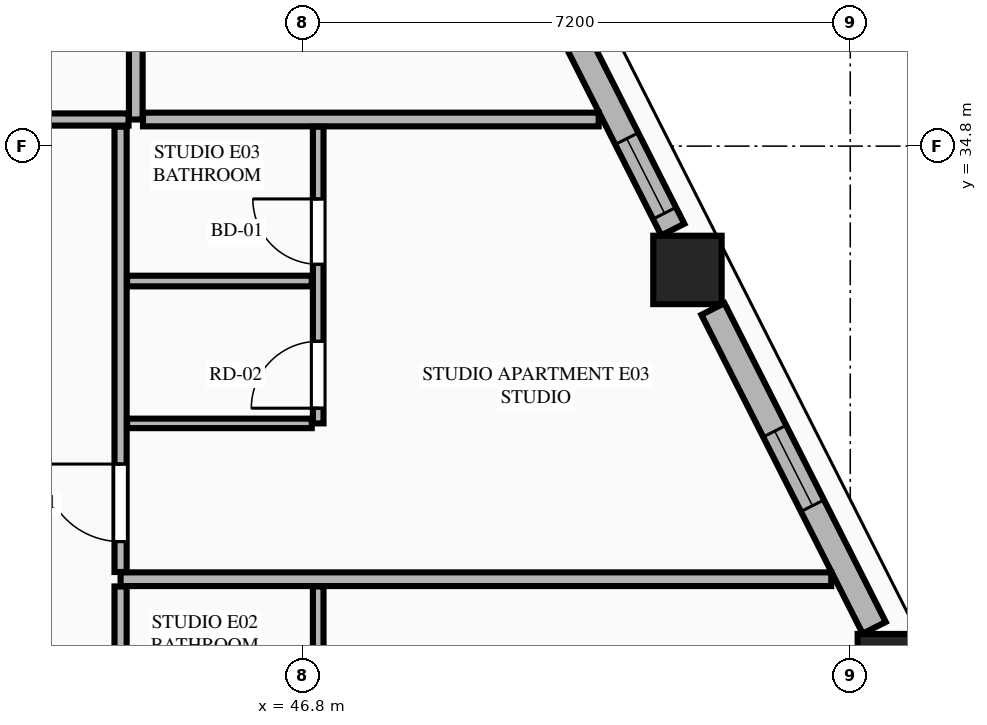
"""IFC4 building model, lengths in metres.
Left out: names, types, materials, properties, quantities, classifications, styles, units other than length and angle.
Written with IfcOpenShell. Run it as: python <this file> out.ifc"""

import sys

from ifc_helpers import new_model, si_unit, direction, frame, frame_2d, origin, origin_2d, place, context, subcontext, project, spatial, rectangle, extrude, element, fill, save


model = new_model("IFC4")
c1 = context("Model", 3, precision=1e-05, world=origin(), true_north=direction((0.0, 1.0)))
c2 = subcontext(c1, "Body", "Model", "MODEL_VIEW")
j1 = project(units=[si_unit("LENGTHUNIT", "METRE"), si_unit("PLANEANGLEUNIT", "RADIAN")], contexts=[c1])
p1 = place(None, origin())
s1 = spatial("IfcSite", under=j1, at=p1, CompositionType="ELEMENT")
p2 = place(p1, origin())
s2 = spatial("IfcBuilding", under=s1, at=p2, CompositionType="ELEMENT")
p3 = place(p2, frame((0.0, 0.0, 186.1)))
s3 = spatial("IfcBuildingStorey", under=s2, at=p3, CompositionType="ELEMENT", Elevation=186.1)
for number, where, z_axis, x_axis in (
    (1, (54.547, 27.932, 0.0), (0.0, 0.0, 1.0), (1.0, 0.0, 0.0)),
    (2, (51.858, 33.171, 0.0), (0.0, 0.0, 1.0), (1.0, 0.0, 0.0)),
):
    element("IfcColumn", number, at=place(p3, frame(where, z_axis=z_axis, x_axis=x_axis)), inside=s3, PredefinedType="COLUMN", context=c2, shape_type="SweptSolid", body=[
        extrude(rectangle(XDim=0.9, YDim=0.9, at=origin_2d()), origin(), (0.0, 0.0, 1.0), 3.55),
    ])
p4 = place(p3, frame((54.315, 28.463, 0.0), z_axis=(0.0, 0.0, 1.0), x_axis=(-0.451426298588, 0.892308409096, 0.0)))
e3 = element("IfcWall", 3, at=p4, inside=s3, PredefinedType="STANDARD", context=c2, shape_type="SweptSolid", body=[
    extrude(rectangle(XDim=4.7, YDim=0.34, at=frame_2d((2.35, 0.0))), origin(), (0.0, 0.0, 1.0), 2.883),
])
p5 = place(p4, frame((1.8, 0.0, 0.75)))
e4 = element("IfcOpeningElement", 4, at=p5, cuts=e3, PredefinedType="OPENING", context=c2, shape_type="SweptSolid", body=[
    extrude(rectangle(XDim=1.1, YDim=1.983, at=frame_2d((0.55, 0.991))), frame((0.0, 0.18, 0.0), z_axis=(0.0, -1.0, 0.0), x_axis=(1.0, 0.0, 0.0)), (0.0, 0.0, 1.0), 0.36),
])
p6 = place(p3, frame((51.665, 33.702, 0.0), z_axis=(0.0, 0.0, 1.0), x_axis=(-0.451524246964, 0.89225884944, 0.0)))
e5 = element("IfcWall", 5, at=p6, inside=s3, PredefinedType="STANDARD", context=c2, shape_type="SweptSolid", body=[
    extrude(rectangle(XDim=4.91, YDim=0.34, at=frame_2d((2.455, 0.0))), origin(), (0.0, 0.0, 1.0), 2.883),
])
p7 = place(p6, frame((0.241, 0.0, 0.75)))
e6 = element("IfcOpeningElement", 6, at=p7, cuts=e5, PredefinedType="OPENING", context=c2, shape_type="SweptSolid", body=[
    extrude(rectangle(XDim=1.1, YDim=1.983, at=frame_2d((0.55, 0.991))), frame((0.0, 0.18, 0.0), z_axis=(0.0, -1.0, 0.0), x_axis=(1.0, 0.0, 0.0)), (0.0, 0.0, 1.0), 0.36),
])
p8 = place(p6, frame((2.847, 0.0, 0.75)))
e7 = element("IfcOpeningElement", 7, at=p8, cuts=e5, PredefinedType="OPENING", context=c2, shape_type="SweptSolid", body=[
    extrude(rectangle(XDim=1.1, YDim=1.983, at=frame_2d((0.55, 0.991))), frame((0.0, 0.18, 0.0), z_axis=(0.0, -1.0, 0.0), x_axis=(1.0, 0.0, 0.0)), (0.0, 0.0, 1.0), 0.36),
])
p9 = place(p3, frame((44.6, 35.15, 0.0), z_axis=(0.0, 0.0, 1.0), x_axis=(0.0, 1.0, 0.0)))
e8 = element("IfcWall", 8, at=p9, inside=s3, PredefinedType="PARTITIONING", context=c2, shape_type="SweptSolid", body=[
    extrude(rectangle(XDim=10.482, YDim=0.18, at=frame_2d((5.241, 0.0))), origin(), (0.0, 0.0, 1.0), 3.35),
])
p10 = place(p3, frame((20.295, 35.15, 0.0), z_axis=(0.0, 0.0, 1.0), x_axis=(1.0, 0.0, 0.0)))
e9 = element("IfcWall", 9, at=p10, inside=s3, PredefinedType="PARTITIONING", context=c2, shape_type="SweptSolid", body=[
    extrude(rectangle(XDim=24.21, YDim=0.16, at=frame_2d((12.105, 0.0))), origin(), (0.0, 0.0, 1.0), 3.35),
])
p11 = place(p10, frame((0.405, 0.0, 0.0)))
e10 = element("IfcOpeningElement", 10, at=p11, cuts=e9, PredefinedType="OPENING", context=c2, shape_type="SweptSolid", body=[
    extrude(rectangle(XDim=1.35, YDim=2.35, at=frame_2d((0.675, 1.175))), frame((0.0, 0.09, 0.0), z_axis=(0.0, -1.0, 0.0), x_axis=(1.0, 0.0, 0.0)), (0.0, 0.0, 1.0), 0.18),
])
p12 = place(p3, frame((44.695, 35.15, 0.0), z_axis=(0.0, 0.0, 1.0), x_axis=(1.0, 0.0, 0.0)))
e11 = element("IfcWall", 11, at=p12, inside=s3, PredefinedType="PARTITIONING", context=c2, shape_type="SweptSolid", body=[
    extrude(rectangle(XDim=5.995, YDim=0.18, at=frame_2d((2.998, 0.0))), origin(), (0.0, 0.0, 1.0), 3.35),
])
p13 = place(p3, frame((44.4, 22.771, 0.0), z_axis=(0.0, 0.0, 1.0), x_axis=(0.0, 1.0, 0.0)))
e12 = element("IfcWall", 12, at=p13, inside=s3, PredefinedType="PARTITIONING", context=c2, shape_type="SweptSolid", body=[
    extrude(rectangle(XDim=6.236, YDim=0.16, at=frame_2d((3.118, 0.0))), origin(), (0.0, 0.0, 1.0), 3.35),
])
p14 = place(p13, frame((0.4, 0.0, 0.0)))
e13 = element("IfcOpeningElement", 13, at=p14, cuts=e12, PredefinedType="OPENING", context=c2, shape_type="SweptSolid", body=[
    extrude(rectangle(XDim=1.02, YDim=2.25, at=frame_2d((0.51, 1.125))), frame((0.0, 0.09, 0.0), z_axis=(0.0, -1.0, 0.0), x_axis=(1.0, 0.0, 0.0)), (0.0, 0.0, 1.0), 0.18),
])
p15 = place(p3, frame((47.0, 24.726, 0.0), z_axis=(0.0, 0.0, 1.0), x_axis=(0.0, 1.0, 0.0)))
e14 = element("IfcWall", 14, at=p15, inside=s3, PredefinedType="PLUMBINGWALL", context=c2, shape_type="SweptSolid", body=[
    extrude(rectangle(XDim=4.281, YDim=0.14, at=frame_2d((2.141, 0.0))), origin(), (0.0, 0.0, 1.0), 3.35),
])
p16 = place(p15, frame((2.275, 0.0, 0.0)))
e15 = element("IfcOpeningElement", 15, at=p16, cuts=e14, PredefinedType="OPENING", context=c2, shape_type="SweptSolid", body=[
    extrude(rectangle(XDim=0.86, YDim=2.1, at=frame_2d((0.43, 1.05))), frame((0.0, 0.08, 0.0), z_axis=(0.0, -1.0, 0.0), x_axis=(1.0, 0.0, 0.0)), (0.0, 0.0, 1.0), 0.16),
])
p17 = place(p15, frame((0.2, 0.0, 0.0)))
e16 = element("IfcOpeningElement", 16, at=p17, cuts=e14, PredefinedType="OPENING", context=c2, shape_type="SweptSolid", body=[
    extrude(rectangle(XDim=0.88, YDim=2.15, at=frame_2d((0.44, 1.075))), frame((0.0, 0.08, 0.0), z_axis=(0.0, -1.0, 0.0), x_axis=(1.0, 0.0, 0.0)), (0.0, 0.0, 1.0), 0.16),
])
p18 = place(p3, frame((44.4, 29.102, 0.0), z_axis=(0.0, 0.0, 1.0), x_axis=(1.0, 0.0, 0.0)))
e17 = element("IfcWall", 17, at=p18, inside=s3, PredefinedType="PARTITIONING", context=c2, shape_type="SweptSolid", body=[
    extrude(rectangle(XDim=9.35, YDim=0.18, at=frame_2d((4.675, 0.0))), origin(), (0.0, 0.0, 1.0), 3.35),
])
p19 = place(p3, frame((44.4, 29.197, 0.0), z_axis=(0.0, 0.0, 1.0), x_axis=(0.0, 1.0, 0.0)))
e18 = element("IfcWall", 18, at=p19, inside=s3, PredefinedType="PARTITIONING", context=c2, shape_type="SweptSolid", body=[
    extrude(rectangle(XDim=5.858, YDim=0.16, at=frame_2d((2.929, 0.0))), origin(), (0.0, 0.0, 1.0), 3.35),
])
p20 = place(p19, frame((0.4, 0.0, 0.0)))
e19 = element("IfcOpeningElement", 19, at=p20, cuts=e18, PredefinedType="OPENING", context=c2, shape_type="SweptSolid", body=[
    extrude(rectangle(XDim=1.02, YDim=2.25, at=frame_2d((0.51, 1.125))), frame((0.0, 0.09, 0.0), z_axis=(0.0, -1.0, 0.0), x_axis=(1.0, 0.0, 0.0)), (0.0, 0.0, 1.0), 0.18),
])
p21 = place(p3, frame((44.485, 31.152, 0.0), z_axis=(0.0, 0.0, 1.0), x_axis=(1.0, 0.0, 0.0)))
e20 = element("IfcWall", 20, at=p21, inside=s3, PredefinedType="PARTITIONING", context=c2, shape_type="SweptSolid", body=[
    extrude(rectangle(XDim=2.43, YDim=0.125, at=frame_2d((1.215, 0.0))), origin(), (0.0, 0.0, 1.0), 3.35),
])
p22 = place(p3, frame((47.0, 31.152, 0.0), z_axis=(0.0, 0.0, 1.0), x_axis=(0.0, 1.0, 0.0)))
e21 = element("IfcWall", 21, at=p22, inside=s3, PredefinedType="PLUMBINGWALL", context=c2, shape_type="SweptSolid", body=[
    extrude(rectangle(XDim=3.903, YDim=0.14, at=frame_2d((1.951, 0.0))), origin(), (0.0, 0.0, 1.0), 3.35),
])
p23 = place(p22, frame((2.093, 0.0, 0.0)))
e22 = element("IfcOpeningElement", 22, at=p23, cuts=e21, PredefinedType="OPENING", context=c2, shape_type="SweptSolid", body=[
    extrude(rectangle(XDim=0.86, YDim=2.1, at=frame_2d((0.43, 1.05))), frame((0.0, 0.08, 0.0), z_axis=(0.0, -1.0, 0.0), x_axis=(1.0, 0.0, 0.0)), (0.0, 0.0, 1.0), 0.16),
])
p24 = place(p22, frame((0.2, 0.0, 0.0)))
e23 = element("IfcOpeningElement", 23, at=p24, cuts=e21, PredefinedType="OPENING", context=c2, shape_type="SweptSolid", body=[
    extrude(rectangle(XDim=0.88, YDim=2.15, at=frame_2d((0.44, 1.075))), frame((0.0, 0.08, 0.0), z_axis=(0.0, -1.0, 0.0), x_axis=(1.0, 0.0, 0.0)), (0.0, 0.0, 1.0), 0.16),
])
p25 = place(p3, frame((44.485, 33.025, 0.0), z_axis=(0.0, 0.0, 1.0), x_axis=(1.0, 0.0, 0.0)))
e24 = element("IfcWall", 24, at=p25, inside=s3, PredefinedType="PLUMBINGWALL", context=c2, shape_type="SweptSolid", body=[
    extrude(rectangle(XDim=2.43, YDim=0.14, at=frame_2d((1.215, 0.0))), origin(), (0.0, 0.0, 1.0), 3.35),
])
p26 = place(p5, origin())
e25 = element("IfcWindow", 25, at=p26, inside=s3, PartitioningType="SINGLE_PANEL", PredefinedType="WINDOW", context=c2, shape_type="SweptSolid", body=[
    extrude(rectangle(XDim=1.1, YDim=1.983, at=frame_2d((0.55, 0.991))), frame((0.0, 0.03, 0.0), z_axis=(0.0, -1.0, 0.0), x_axis=(1.0, 0.0, 0.0)), (0.0, 0.0, 1.0), 0.06),
])
fill(e4, e25)
p27 = place(p7, origin())
e26 = element("IfcWindow", 26, at=p27, inside=s3, PartitioningType="SINGLE_PANEL", PredefinedType="WINDOW", context=c2, shape_type="SweptSolid", body=[
    extrude(rectangle(XDim=1.1, YDim=1.983, at=frame_2d((0.55, 0.991))), frame((0.0, 0.03, 0.0), z_axis=(0.0, -1.0, 0.0), x_axis=(1.0, 0.0, 0.0)), (0.0, 0.0, 1.0), 0.06),
])
fill(e6, e26)
p28 = place(p23, origin())
e27 = element("IfcDoor", 27, at=p28, inside=s3, OperationType="SINGLE_SWING_RIGHT", PredefinedType="DOOR", context=c2, shape_type="SweptSolid", body=[
    extrude(rectangle(XDim=0.86, YDim=2.1, at=frame_2d((0.43, 1.05))), frame((0.0, 0.025, 0.0), z_axis=(0.0, -1.0, 0.0), x_axis=(1.0, 0.0, 0.0)), (0.0, 0.0, 1.0), 0.05),
])
fill(e22, e27)
p29 = place(p20, origin())
e28 = element("IfcDoor", 28, at=p29, inside=s3, OperationType="SINGLE_SWING_RIGHT", PredefinedType="DOOR", context=c2, shape_type="SweptSolid", body=[
    extrude(rectangle(XDim=1.02, YDim=2.25, at=frame_2d((0.51, 1.125))), frame((0.0, 0.025, 0.0), z_axis=(0.0, -1.0, 0.0), x_axis=(1.0, 0.0, 0.0)), (0.0, 0.0, 1.0), 0.05),
])
fill(e19, e28)
p30 = place(p24, origin())
e29 = element("IfcDoor", 29, at=p30, inside=s3, OperationType="SINGLE_SWING_LEFT", PredefinedType="DOOR", context=c2, shape_type="SweptSolid", body=[
    extrude(rectangle(XDim=0.88, YDim=2.15, at=frame_2d((0.44, 1.075))), frame((0.0, 0.025, 0.0), z_axis=(0.0, -1.0, 0.0), x_axis=(1.0, 0.0, 0.0)), (0.0, 0.0, 1.0), 0.05),
])
fill(e23, e29)
save(model, sys.argv[1])
